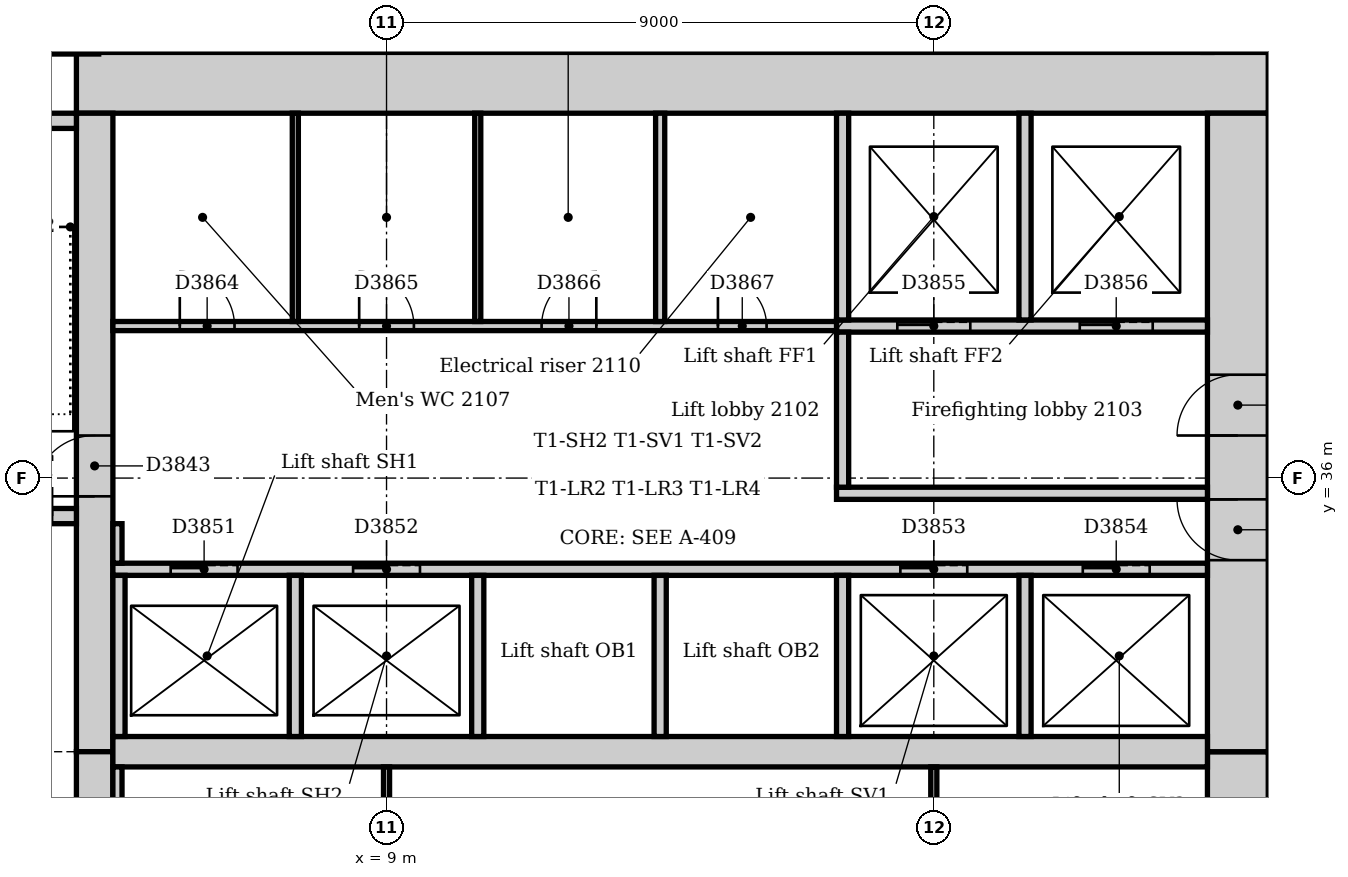
"""IFC4 building model, lengths in metres.
Left out: names, types, materials, properties, quantities, classifications, styles, units other than length and angle.
Written with IfcOpenShell. Run it as: python <this file> out.ifc"""

import sys

from ifc_helpers import new_model, si_unit, direction, frame, frame_2d, origin, origin_2d, place, context, subcontext, project, spatial, rectangle, extrude, element, fill, save


model = new_model("IFC4")
c1 = context("Model", 3, precision=1e-05, world=origin(), true_north=direction((0.0, 1.0)))
c2 = subcontext(c1, "Body", "Model", "MODEL_VIEW")
j1 = project(units=[si_unit("LENGTHUNIT", "METRE"), si_unit("PLANEANGLEUNIT", "RADIAN")], contexts=[c1])
p1 = place(None, origin())
s1 = spatial("IfcSite", under=j1, at=p1, CompositionType="ELEMENT")
p2 = place(p1, origin())
s2 = spatial("IfcBuilding", under=s1, at=p2, CompositionType="ELEMENT")
p3 = place(p2, frame((0.0, 0.0, 91.0)))
s3 = spatial("IfcBuildingStorey", under=s2, at=p3, CompositionType="ELEMENT", Elevation=91.0)
p4 = place(p3, frame((23.5, 42.5, 0.0), z_axis=(0.0, 0.0, 1.0), x_axis=(-1.0, 0.0, 0.0)))
e1 = element("IfcWall", 1, at=p4, inside=s3, PredefinedType="SOLIDWALL", context=c2, shape_type="SweptSolid", body=[
    extrude(rectangle(XDim=19.6, YDim=1.0, at=frame_2d((9.8, 0.0))), origin(), (0.0, 0.0, 1.0), 4.0),
])
p5 = place(p3, frame((23.0, 21.0, 0.0), z_axis=(0.0, 0.0, 1.0), x_axis=(0.0, 1.0, 0.0)))
e2 = element("IfcWall", 2, at=p5, inside=s3, PredefinedType="SOLIDWALL", context=c2, shape_type="SweptSolid", body=[
    extrude(rectangle(XDim=10.5, YDim=1.0, at=frame_2d((5.25, 0.0))), origin(), (0.0, 0.0, 1.0), 4.0),
])
p6 = place(p5, frame((4.35, 0.0, 0.0)))
e3 = element("IfcOpeningElement", 3, at=p6, cuts=e2, PredefinedType="OPENING", context=c2, shape_type="SweptSolid", body=[
    extrude(rectangle(XDim=1.8, YDim=2.1, at=frame_2d((0.9, 1.05))), frame((0.0, 0.51, 0.0), z_axis=(0.0, -1.0, 0.0), x_axis=(1.0, 0.0, 0.0)), (0.0, 0.0, 1.0), 1.02),
])
p7 = place(p3, frame((23.0, 31.5, 0.0), z_axis=(0.0, 0.0, 1.0), x_axis=(0.0, 1.0, 0.0)))
e4 = element("IfcWall", 4, at=p7, inside=s3, PredefinedType="SOLIDWALL", context=c2, shape_type="SweptSolid", body=[
    extrude(rectangle(XDim=10.5, YDim=1.0, at=frame_2d((5.25, 0.0))), origin(), (0.0, 0.0, 1.0), 4.0),
])
p8 = place(p7, frame((3.15, 0.0, 0.0)))
e5 = element("IfcOpeningElement", 5, at=p8, cuts=e4, PredefinedType="OPENING", context=c2, shape_type="SweptSolid", body=[
    extrude(rectangle(XDim=1.0, YDim=2.1, at=frame_2d((0.5, 1.05))), frame((0.0, 0.51, 0.0), z_axis=(0.0, -1.0, 0.0), x_axis=(1.0, 0.0, 0.0)), (0.0, 0.0, 1.0), 1.02),
])
p9 = place(p7, frame((5.2, 0.0, 0.0)))
e6 = element("IfcOpeningElement", 6, at=p9, cuts=e4, PredefinedType="OPENING", context=c2, shape_type="SweptSolid", body=[
    extrude(rectangle(XDim=1.0, YDim=2.1, at=frame_2d((0.5, 1.05))), frame((0.0, 0.51, 0.0), z_axis=(0.0, -1.0, 0.0), x_axis=(1.0, 0.0, 0.0)), (0.0, 0.0, 1.0), 1.02),
])
p10 = place(p3, frame((4.2, 42.0, 0.0), z_axis=(0.0, 0.0, 1.0), x_axis=(0.0, -1.0, 0.0)))
e7 = element("IfcWall", 7, at=p10, inside=s3, PredefinedType="SOLIDWALL", context=c2, shape_type="SweptSolid", body=[
    extrude(rectangle(XDim=10.5, YDim=0.6, at=frame_2d((5.25, 0.0))), origin(), (0.0, 0.0, 1.0), 4.0),
])
p11 = place(p10, frame((5.3, 0.0, 0.0)))
e8 = element("IfcOpeningElement", 8, at=p11, cuts=e7, PredefinedType="OPENING", context=c2, shape_type="SweptSolid", body=[
    extrude(rectangle(XDim=1.0, YDim=2.1, at=frame_2d((0.5, 1.05))), frame((0.0, 0.31, 0.0), z_axis=(0.0, -1.0, 0.0), x_axis=(1.0, 0.0, 0.0)), (0.0, 0.0, 1.0), 0.62),
])
p12 = place(p3, frame((4.2, 31.5, 0.0), z_axis=(0.0, 0.0, 1.0), x_axis=(0.0, -1.0, 0.0)))
e9 = element("IfcWall", 9, at=p12, inside=s3, PredefinedType="SOLIDWALL", context=c2, shape_type="SweptSolid", body=[
    extrude(rectangle(XDim=10.5, YDim=0.6, at=frame_2d((5.25, 0.0))), origin(), (0.0, 0.0, 1.0), 4.0),
])
p13 = place(p12, frame((4.25, 0.0, 0.0)))
e10 = element("IfcOpeningElement", 10, at=p13, cuts=e9, PredefinedType="OPENING", context=c2, shape_type="SweptSolid", body=[
    extrude(rectangle(XDim=1.0, YDim=2.1, at=frame_2d((0.5, 1.05))), frame((0.0, 0.31, 0.0), z_axis=(0.0, -1.0, 0.0), x_axis=(1.0, 0.0, 0.0)), (0.0, 0.0, 1.0), 0.62),
])
p14 = place(p3, frame((4.5, 31.5, 0.0), z_axis=(0.0, 0.0, 1.0), x_axis=(1.0, 0.0, 0.0)))
e11 = element("IfcWall", 11, at=p14, inside=s3, PredefinedType="SOLIDWALL", context=c2, shape_type="SweptSolid", body=[
    extrude(rectangle(XDim=18.0, YDim=0.5, at=frame_2d((9.0, 0.0))), origin(), (0.0, 0.0, 1.0), 4.0),
])
p15 = place(p3, frame((0.36, 35.375, 0.0), z_axis=(0.0, 0.0, 1.0), x_axis=(1.0, 0.0, 0.0)))
e12 = element("IfcWall", 12, at=p15, inside=s3, PredefinedType="SOLIDWALL", context=c2, shape_type="SweptSolid", body=[
    extrude(rectangle(XDim=3.54, YDim=0.25, at=frame_2d((1.77, 0.0))), origin(), (0.0, 0.0, 1.0), 4.0),
])
p16 = place(p15, frame((2.14, 0.0, 0.0)))
e13 = element("IfcOpeningElement", 13, at=p16, cuts=e12, PredefinedType="OPENING", context=c2, shape_type="SweptSolid", body=[
    extrude(rectangle(XDim=1.0, YDim=2.1, at=frame_2d((0.5, 1.05))), frame((0.0, 0.135, 0.0), z_axis=(0.0, -1.0, 0.0), x_axis=(1.0, 0.0, 0.0)), (0.0, 0.0, 1.0), 0.27),
])
p17 = place(p3, frame((3.9, 41.875, 0.0), z_axis=(0.0, 0.0, 1.0), x_axis=(-1.0, 0.0, 0.0)))
e14 = element("IfcWall", 14, at=p17, inside=s3, PredefinedType="SOLIDWALL", context=c2, shape_type="SweptSolid", body=[
    extrude(rectangle(XDim=3.54, YDim=0.25, at=frame_2d((1.77, 0.0))), origin(), (0.0, 0.0, 1.0), 4.0),
])
p18 = place(p3, frame((3.667, 43.574, 0.0), z_axis=(0.0, 0.0, 1.0), x_axis=(1.0, 0.0, 0.0)))
e15 = element("IfcColumn", 15, at=p18, inside=s3, PredefinedType="COLUMN", context=c2, shape_type="SweptSolid", body=[
    extrude(rectangle(XDim=1.2, YDim=1.2, at=origin_2d()), origin(), (0.0, 0.0, 1.0), 3.7),
])
p19 = place(p3, frame((16.4, 35.75, 0.0), z_axis=(0.0, 0.0, 1.0), x_axis=(1.0, 0.0, 0.0)))
e16 = element("IfcWall", 16, at=p19, inside=s3, PredefinedType="PARTITIONING", context=c2, shape_type="SweptSolid", body=[
    extrude(rectangle(XDim=6.1, YDim=0.2, at=frame_2d((3.05, 0.0))), origin(), (0.0, 0.0, 1.0), 3.7),
])
p20 = place(p3, frame((16.4, 38.5, 0.0), z_axis=(0.0, 0.0, 1.0), x_axis=(1.0, 0.0, 0.0)))
e17 = element("IfcWall", 17, at=p20, inside=s3, PredefinedType="PARTITIONING", context=c2, shape_type="SweptSolid", body=[
    extrude(rectangle(XDim=6.1, YDim=0.2, at=frame_2d((3.05, 0.0))), origin(), (0.0, 0.0, 1.0), 3.7),
])
p21 = place(p20, frame((1.0, 0.0, 0.0)))
e18 = element("IfcOpeningElement", 18, at=p21, cuts=e17, PredefinedType="OPENING", context=c2, shape_type="SweptSolid", body=[
    extrude(rectangle(XDim=1.2, YDim=2.1, at=frame_2d((0.6, 1.05))), frame((0.0, 0.11, 0.0), z_axis=(0.0, -1.0, 0.0), x_axis=(1.0, 0.0, 0.0)), (0.0, 0.0, 1.0), 0.22),
])
p22 = place(p20, frame((4.0, 0.0, 0.0)))
e19 = element("IfcOpeningElement", 19, at=p22, cuts=e17, PredefinedType="OPENING", context=c2, shape_type="SweptSolid", body=[
    extrude(rectangle(XDim=1.2, YDim=2.1, at=frame_2d((0.6, 1.05))), frame((0.0, 0.11, 0.0), z_axis=(0.0, -1.0, 0.0), x_axis=(1.0, 0.0, 0.0)), (0.0, 0.0, 1.0), 0.22),
])
p23 = place(p3, frame((16.5, 35.85, 0.0), z_axis=(0.0, 0.0, 1.0), x_axis=(0.0, 1.0, 0.0)))
e20 = element("IfcWall", 20, at=p23, inside=s3, PredefinedType="PARTITIONING", context=c2, shape_type="SweptSolid", body=[
    extrude(rectangle(XDim=2.55, YDim=0.2, at=frame_2d((1.275, 0.0))), origin(), (0.0, 0.0, 1.0), 3.7),
])
p24 = place(p3, frame((4.5, 34.5, 0.0), z_axis=(0.0, 0.0, 1.0), x_axis=(1.0, 0.0, 0.0)))
e21 = element("IfcWall", 21, at=p24, inside=s3, PredefinedType="PARTITIONING", context=c2, shape_type="SweptSolid", body=[
    extrude(rectangle(XDim=18.0, YDim=0.2, at=frame_2d((9.0, 0.0))), origin(), (0.0, 0.0, 1.0), 3.7),
])
p25 = place(p24, frame((0.95, 0.0, 0.0)))
e22 = element("IfcOpeningElement", 22, at=p25, cuts=e21, PredefinedType="OPENING", context=c2, shape_type="SweptSolid", body=[
    extrude(rectangle(XDim=1.1, YDim=2.1, at=frame_2d((0.55, 1.05))), frame((0.0, 0.11, 0.0), z_axis=(0.0, -1.0, 0.0), x_axis=(1.0, 0.0, 0.0)), (0.0, 0.0, 1.0), 0.22),
])
p26 = place(p24, frame((3.95, 0.0, 0.0)))
e23 = element("IfcOpeningElement", 23, at=p26, cuts=e21, PredefinedType="OPENING", context=c2, shape_type="SweptSolid", body=[
    extrude(rectangle(XDim=1.1, YDim=2.1, at=frame_2d((0.55, 1.05))), frame((0.0, 0.11, 0.0), z_axis=(0.0, -1.0, 0.0), x_axis=(1.0, 0.0, 0.0)), (0.0, 0.0, 1.0), 0.22),
])
p27 = place(p24, frame((12.95, 0.0, 0.0)))
e24 = element("IfcOpeningElement", 24, at=p27, cuts=e21, PredefinedType="OPENING", context=c2, shape_type="SweptSolid", body=[
    extrude(rectangle(XDim=1.1, YDim=2.1, at=frame_2d((0.55, 1.05))), frame((0.0, 0.11, 0.0), z_axis=(0.0, -1.0, 0.0), x_axis=(1.0, 0.0, 0.0)), (0.0, 0.0, 1.0), 0.22),
])
p28 = place(p24, frame((15.95, 0.0, 0.0)))
e25 = element("IfcOpeningElement", 25, at=p28, cuts=e21, PredefinedType="OPENING", context=c2, shape_type="SweptSolid", body=[
    extrude(rectangle(XDim=1.1, YDim=2.1, at=frame_2d((0.55, 1.05))), frame((0.0, 0.11, 0.0), z_axis=(0.0, -1.0, 0.0), x_axis=(1.0, 0.0, 0.0)), (0.0, 0.0, 1.0), 0.22),
])
for number, where, z_axis, x_axis in (
    (26, (16.5, 38.6, 0.0), (0.0, 0.0, 1.0), (0.0, 1.0, 0.0)),
    (27, (19.5, 38.6, 0.0), (0.0, 0.0, 1.0), (0.0, 1.0, 0.0)),
):
    element("IfcWall", number, at=place(p3, frame(where, z_axis=z_axis, x_axis=x_axis)), inside=s3, PredefinedType="PARTITIONING", context=c2, shape_type="SweptSolid", body=[
        extrude(rectangle(XDim=3.4, YDim=0.2, at=frame_2d((1.7, 0.0))), origin(), (0.0, 0.0, 1.0), 3.7),
    ])
for number, where, z_axis, x_axis in (
    (28, (4.6, 31.75, 0.0), (0.0, 0.0, 1.0), (0.0, 1.0, 0.0)),
    (29, (7.5, 31.75, 0.0), (0.0, 0.0, 1.0), (0.0, 1.0, 0.0)),
    (30, (10.5, 31.75, 0.0), (0.0, 0.0, 1.0), (0.0, 1.0, 0.0)),
    (31, (13.5, 31.75, 0.0), (0.0, 0.0, 1.0), (0.0, 1.0, 0.0)),
    (32, (16.5, 31.75, 0.0), (0.0, 0.0, 1.0), (0.0, 1.0, 0.0)),
    (33, (19.5, 31.75, 0.0), (0.0, 0.0, 1.0), (0.0, 1.0, 0.0)),
):
    element("IfcWall", number, at=place(p3, frame(where, z_axis=z_axis, x_axis=x_axis)), inside=s3, PredefinedType="PARTITIONING", context=c2, shape_type="SweptSolid", body=[
        extrude(rectangle(XDim=2.65, YDim=0.2, at=frame_2d((1.325, 0.0))), origin(), (0.0, 0.0, 1.0), 3.7),
    ])
p29 = place(p3, frame((4.5, 38.5, 0.0), z_axis=(0.0, 0.0, 1.0), x_axis=(1.0, 0.0, 0.0)))
e34 = element("IfcWall", 34, at=p29, inside=s3, PredefinedType="PARTITIONING", context=c2, shape_type="SweptSolid", body=[
    extrude(rectangle(XDim=11.9, YDim=0.15, at=frame_2d((5.95, 0.0))), origin(), (0.0, 0.0, 1.0), 3.7),
])
p30 = place(p29, frame((1.1, 0.0, 0.0)))
e35 = element("IfcOpeningElement", 35, at=p30, cuts=e34, PredefinedType="OPENING", context=c2, shape_type="SweptSolid", body=[
    extrude(rectangle(XDim=0.9, YDim=2.1, at=frame_2d((0.45, 1.05))), frame((0.0, 0.085, 0.0), z_axis=(0.0, -1.0, 0.0), x_axis=(1.0, 0.0, 0.0)), (0.0, 0.0, 1.0), 0.17),
])
p31 = place(p29, frame((4.05, 0.0, 0.0)))
e36 = element("IfcOpeningElement", 36, at=p31, cuts=e34, PredefinedType="OPENING", context=c2, shape_type="SweptSolid", body=[
    extrude(rectangle(XDim=0.9, YDim=2.1, at=frame_2d((0.45, 1.05))), frame((0.0, 0.085, 0.0), z_axis=(0.0, -1.0, 0.0), x_axis=(1.0, 0.0, 0.0)), (0.0, 0.0, 1.0), 0.17),
])
p32 = place(p29, frame((7.05, 0.0, 0.0)))
e37 = element("IfcOpeningElement", 37, at=p32, cuts=e34, PredefinedType="OPENING", context=c2, shape_type="SweptSolid", body=[
    extrude(rectangle(XDim=0.9, YDim=2.1, at=frame_2d((0.45, 1.05))), frame((0.0, 0.085, 0.0), z_axis=(0.0, -1.0, 0.0), x_axis=(1.0, 0.0, 0.0)), (0.0, 0.0, 1.0), 0.17),
])
p33 = place(p29, frame((9.95, 0.0, 0.0)))
e38 = element("IfcOpeningElement", 38, at=p33, cuts=e34, PredefinedType="OPENING", context=c2, shape_type="SweptSolid", body=[
    extrude(rectangle(XDim=0.8, YDim=2.1, at=frame_2d((0.4, 1.05))), frame((0.0, 0.085, 0.0), z_axis=(0.0, -1.0, 0.0), x_axis=(1.0, 0.0, 0.0)), (0.0, 0.0, 1.0), 0.17),
])
p34 = place(p3, frame((4.575, 28.575, 0.0), z_axis=(0.0, 0.0, 1.0), x_axis=(0.0, 1.0, 0.0)))
e39 = element("IfcWall", 39, at=p34, inside=s3, PredefinedType="PARTITIONING", context=c2, shape_type="SweptSolid", body=[
    extrude(rectangle(XDim=2.675, YDim=0.15, at=frame_2d((1.337, 0.0))), origin(), (0.0, 0.0, 1.0), 3.7),
])
p35 = place(p3, frame((4.575, 34.6, 0.0), z_axis=(0.0, 0.0, 1.0), x_axis=(0.0, 1.0, 0.0)))
e40 = element("IfcWall", 40, at=p35, inside=s3, PredefinedType="PARTITIONING", context=c2, shape_type="SweptSolid", body=[
    extrude(rectangle(XDim=0.65, YDim=0.15, at=frame_2d((0.325, 0.0))), origin(), (0.0, 0.0, 1.0), 3.7),
])
p36 = place(p3, frame((13.5, 38.575, 0.0), z_axis=(0.0, 0.0, 1.0), x_axis=(0.0, 1.0, 0.0)))
e41 = element("IfcWall", 41, at=p36, inside=s3, PredefinedType="PARTITIONING", context=c2, shape_type="SweptSolid", body=[
    extrude(rectangle(XDim=3.425, YDim=0.15, at=frame_2d((1.712, 0.0))), origin(), (0.0, 0.0, 1.0), 3.7),
])
for number, where, z_axis, x_axis in (
    (42, (7.5, 38.575, 0.0), (0.0, 0.0, 1.0), (0.0, 1.0, 0.0)),
    (43, (10.5, 38.575, 0.0), (0.0, 0.0, 1.0), (0.0, 1.0, 0.0)),
):
    element("IfcWall", number, at=place(p3, frame(where, z_axis=z_axis, x_axis=x_axis)), inside=s3, PredefinedType="PARTITIONING", context=c2, shape_type="SweptSolid", body=[
        extrude(rectangle(XDim=3.425, YDim=0.1, at=frame_2d((1.712, 0.0))), origin(), (0.0, 0.0, 1.0), 3.7),
    ])
for number, where, z_axis, x_axis in (
    (44, (9.0, 28.575, 0.0), (0.0, 0.0, 1.0), (0.0, 1.0, 0.0)),
    (45, (18.0, 28.575, 0.0), (0.0, 0.0, 1.0), (0.0, 1.0, 0.0)),
):
    element("IfcWall", number, at=place(p3, frame(where, z_axis=z_axis, x_axis=x_axis)), inside=s3, PredefinedType="PARTITIONING", context=c2, shape_type="SweptSolid", body=[
        extrude(rectangle(XDim=2.675, YDim=0.1, at=frame_2d((1.337, 0.0))), origin(), (0.0, 0.0, 1.0), 3.7),
    ])
p37 = place(p11, frame((1.0, 0.0, 0.0), z_axis=(0.0, 0.0, 1.0), x_axis=(-1.0, 0.0, 0.0)))
e46 = element("IfcDoor", 46, at=p37, inside=s3, OperationType="SINGLE_SWING_LEFT", PredefinedType="DOOR", context=c2, shape_type="SweptSolid", body=[
    extrude(rectangle(XDim=1.0, YDim=2.1, at=frame_2d((0.5, 1.05))), frame((0.0, 0.025, 0.0), z_axis=(0.0, -1.0, 0.0), x_axis=(1.0, 0.0, 0.0)), (0.0, 0.0, 1.0), 0.05),
])
fill(e8, e46)
p38 = place(p25, origin())
e47 = element("IfcDoor", 47, at=p38, inside=s3, OperationType="SLIDING_TO_LEFT", PredefinedType="DOOR", context=c2, shape_type="SweptSolid", body=[
    extrude(rectangle(XDim=1.1, YDim=2.1, at=frame_2d((0.55, 1.05))), frame((0.0, 0.025, 0.0), z_axis=(0.0, -1.0, 0.0), x_axis=(1.0, 0.0, 0.0)), (0.0, 0.0, 1.0), 0.05),
])
fill(e22, e47)
p39 = place(p26, origin())
e48 = element("IfcDoor", 48, at=p39, inside=s3, OperationType="SLIDING_TO_LEFT", PredefinedType="DOOR", context=c2, shape_type="SweptSolid", body=[
    extrude(rectangle(XDim=1.1, YDim=2.1, at=frame_2d((0.55, 1.05))), frame((0.0, 0.025, 0.0), z_axis=(0.0, -1.0, 0.0), x_axis=(1.0, 0.0, 0.0)), (0.0, 0.0, 1.0), 0.05),
])
fill(e23, e48)
p40 = place(p27, origin())
e49 = element("IfcDoor", 49, at=p40, inside=s3, OperationType="SLIDING_TO_LEFT", PredefinedType="DOOR", context=c2, shape_type="SweptSolid", body=[
    extrude(rectangle(XDim=1.1, YDim=2.1, at=frame_2d((0.55, 1.05))), frame((0.0, 0.025, 0.0), z_axis=(0.0, -1.0, 0.0), x_axis=(1.0, 0.0, 0.0)), (0.0, 0.0, 1.0), 0.05),
])
fill(e24, e49)
p41 = place(p28, origin())
e50 = element("IfcDoor", 50, at=p41, inside=s3, OperationType="SLIDING_TO_LEFT", PredefinedType="DOOR", context=c2, shape_type="SweptSolid", body=[
    extrude(rectangle(XDim=1.1, YDim=2.1, at=frame_2d((0.55, 1.05))), frame((0.0, 0.025, 0.0), z_axis=(0.0, -1.0, 0.0), x_axis=(1.0, 0.0, 0.0)), (0.0, 0.0, 1.0), 0.05),
])
fill(e25, e50)
p42 = place(p21, origin())
e51 = element("IfcDoor", 51, at=p42, inside=s3, OperationType="SLIDING_TO_LEFT", PredefinedType="DOOR", context=c2, shape_type="SweptSolid", body=[
    extrude(rectangle(XDim=1.2, YDim=2.1, at=frame_2d((0.6, 1.05))), frame((0.0, 0.025, 0.0), z_axis=(0.0, -1.0, 0.0), x_axis=(1.0, 0.0, 0.0)), (0.0, 0.0, 1.0), 0.05),
])
fill(e18, e51)
p43 = place(p22, origin())
e52 = element("IfcDoor", 52, at=p43, inside=s3, OperationType="SLIDING_TO_LEFT", PredefinedType="DOOR", context=c2, shape_type="SweptSolid", body=[
    extrude(rectangle(XDim=1.2, YDim=2.1, at=frame_2d((0.6, 1.05))), frame((0.0, 0.025, 0.0), z_axis=(0.0, -1.0, 0.0), x_axis=(1.0, 0.0, 0.0)), (0.0, 0.0, 1.0), 0.05),
])
fill(e19, e52)
p44 = place(p8, origin())
e53 = element("IfcDoor", 53, at=p44, inside=s3, OperationType="SINGLE_SWING_RIGHT", PredefinedType="DOOR", context=c2, shape_type="SweptSolid", body=[
    extrude(rectangle(XDim=1.0, YDim=2.1, at=frame_2d((0.5, 1.05))), frame((0.0, 0.025, 0.0), z_axis=(0.0, -1.0, 0.0), x_axis=(1.0, 0.0, 0.0)), (0.0, 0.0, 1.0), 0.05),
])
fill(e5, e53)
p45 = place(p9, origin())
e54 = element("IfcDoor", 54, at=p45, inside=s3, OperationType="SINGLE_SWING_LEFT", PredefinedType="DOOR", context=c2, shape_type="SweptSolid", body=[
    extrude(rectangle(XDim=1.0, YDim=2.1, at=frame_2d((0.5, 1.05))), frame((0.0, 0.025, 0.0), z_axis=(0.0, -1.0, 0.0), x_axis=(1.0, 0.0, 0.0)), (0.0, 0.0, 1.0), 0.05),
])
fill(e6, e54)
p46 = place(p30, origin())
e55 = element("IfcDoor", 55, at=p46, inside=s3, OperationType="SINGLE_SWING_LEFT", PredefinedType="DOOR", context=c2, shape_type="SweptSolid", body=[
    extrude(rectangle(XDim=0.9, YDim=2.1, at=frame_2d((0.45, 1.05))), frame((0.0, 0.025, 0.0), z_axis=(0.0, -1.0, 0.0), x_axis=(1.0, 0.0, 0.0)), (0.0, 0.0, 1.0), 0.05),
])
fill(e35, e55)
p47 = place(p31, origin())
e56 = element("IfcDoor", 56, at=p47, inside=s3, OperationType="SINGLE_SWING_LEFT", PredefinedType="DOOR", context=c2, shape_type="SweptSolid", body=[
    extrude(rectangle(XDim=0.9, YDim=2.1, at=frame_2d((0.45, 1.05))), frame((0.0, 0.025, 0.0), z_axis=(0.0, -1.0, 0.0), x_axis=(1.0, 0.0, 0.0)), (0.0, 0.0, 1.0), 0.05),
])
fill(e36, e56)
p48 = place(p32, origin())
e57 = element("IfcDoor", 57, at=p48, inside=s3, OperationType="SINGLE_SWING_RIGHT", PredefinedType="DOOR", context=c2, shape_type="SweptSolid", body=[
    extrude(rectangle(XDim=0.9, YDim=2.1, at=frame_2d((0.45, 1.05))), frame((0.0, 0.025, 0.0), z_axis=(0.0, -1.0, 0.0), x_axis=(1.0, 0.0, 0.0)), (0.0, 0.0, 1.0), 0.05),
])
fill(e37, e57)
p49 = place(p33, origin())
e58 = element("IfcDoor", 58, at=p49, inside=s3, OperationType="SINGLE_SWING_LEFT", PredefinedType="DOOR", context=c2, shape_type="SweptSolid", body=[
    extrude(rectangle(XDim=0.8, YDim=2.1, at=frame_2d((0.4, 1.05))), frame((0.0, 0.025, 0.0), z_axis=(0.0, -1.0, 0.0), x_axis=(1.0, 0.0, 0.0)), (0.0, 0.0, 1.0), 0.05),
])
fill(e38, e58)
save(model, sys.argv[1])
